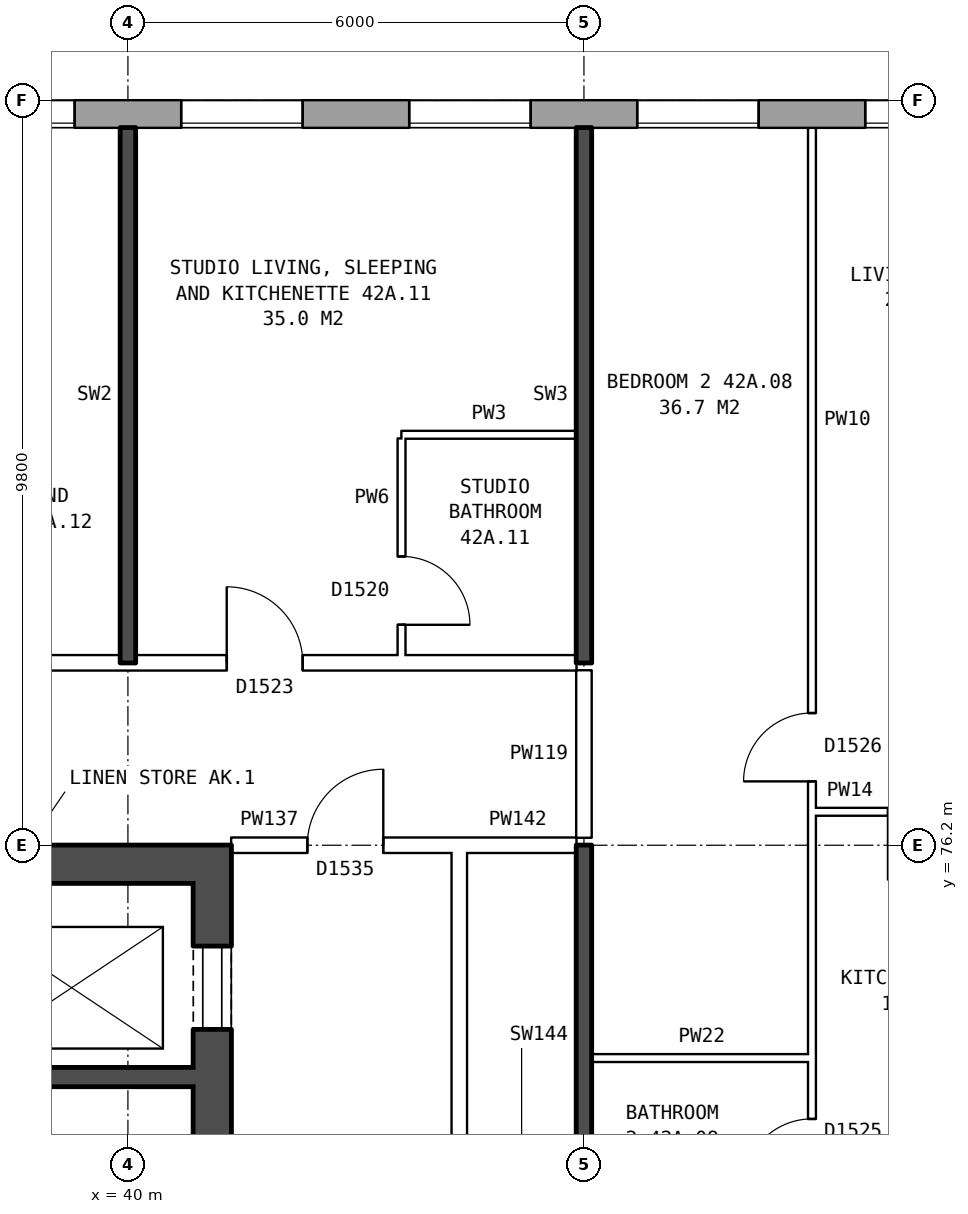
"""IFC4 building model, lengths in metres.
Left out: names, types, materials, properties, quantities, classifications, styles, units other than length and angle.
Written with IfcOpenShell. Run it as: python <this file> out.ifc"""

import sys

from ifc_helpers import new_model, si_unit, direction, frame, frame_2d, origin, place, context, subcontext, project, spatial, rectangle, extrude, element, fill, save


model = new_model("IFC4")
c1 = context("Model", 3, precision=1e-05, world=origin(), true_north=direction((0.0, 1.0)))
c2 = subcontext(c1, "Body", "Model", "MODEL_VIEW")
j1 = project(units=[si_unit("LENGTHUNIT", "METRE"), si_unit("PLANEANGLEUNIT", "RADIAN")], contexts=[c1])
p1 = place(None, origin())
s1 = spatial("IfcSite", under=j1, at=p1, CompositionType="ELEMENT")
p2 = place(p1, origin())
s2 = spatial("IfcBuilding", under=s1, at=p2, CompositionType="ELEMENT")
p3 = place(p2, frame((0.0, 0.0, 151.6)))
s3 = spatial("IfcBuildingStorey", under=s2, at=p3, CompositionType="ELEMENT", Elevation=151.6)
p4 = place(p3, frame((72.925, 85.82, 0.0), z_axis=(0.0, 0.0, 1.0), x_axis=(-1.0, 0.0, 0.0)))
e1 = element("IfcWall", 1, at=p4, inside=s3, PredefinedType="STANDARD", context=c2, shape_type="SweptSolid", body=[
    extrude(rectangle(XDim=41.351, YDim=0.36, at=frame_2d((20.675, 0.0))), origin(), (0.0, 0.0, 1.0), 2.85),
])
p5 = place(p4, frame((0.3, 0.0, 0.8)))
e2 = element("IfcOpeningElement", 2, at=p5, cuts=e1, PredefinedType="OPENING", context=c2, shape_type="SweptSolid", body=[
    extrude(rectangle(XDim=1.4, YDim=1.8, at=frame_2d((0.7, 0.9))), frame((0.0, 0.19, 0.0), z_axis=(0.0, -1.0, 0.0), x_axis=(1.0, 0.0, 0.0)), (0.0, 0.0, 1.0), 0.38),
])
p6 = place(p4, frame((4.225, 0.0, 0.8)))
e3 = element("IfcOpeningElement", 3, at=p6, cuts=e1, PredefinedType="OPENING", context=c2, shape_type="SweptSolid", body=[
    extrude(rectangle(XDim=1.0, YDim=0.9, at=frame_2d((0.5, 0.45))), frame((0.0, 0.19, 0.0), z_axis=(0.0, -1.0, 0.0), x_axis=(1.0, 0.0, 0.0)), (0.0, 0.0, 1.0), 0.38),
])
p7 = place(p4, frame((6.625, 0.0, 0.8)))
e4 = element("IfcOpeningElement", 4, at=p7, cuts=e1, PredefinedType="OPENING", context=c2, shape_type="SweptSolid", body=[
    extrude(rectangle(XDim=1.6, YDim=1.8, at=frame_2d((0.8, 0.9))), frame((0.0, 0.19, 0.0), z_axis=(0.0, -1.0, 0.0), x_axis=(1.0, 0.0, 0.0)), (0.0, 0.0, 1.0), 0.38),
])
p8 = place(p4, frame((9.625, 0.0, 0.8)))
e5 = element("IfcOpeningElement", 5, at=p8, cuts=e1, PredefinedType="OPENING", context=c2, shape_type="SweptSolid", body=[
    extrude(rectangle(XDim=1.6, YDim=1.8, at=frame_2d((0.8, 0.9))), frame((0.0, 0.19, 0.0), z_axis=(0.0, -1.0, 0.0), x_axis=(1.0, 0.0, 0.0)), (0.0, 0.0, 1.0), 0.38),
])
p9 = place(p4, frame((12.625, 0.0, 0.8)))
e6 = element("IfcOpeningElement", 6, at=p9, cuts=e1, PredefinedType="OPENING", context=c2, shape_type="SweptSolid", body=[
    extrude(rectangle(XDim=1.6, YDim=1.8, at=frame_2d((0.8, 0.9))), frame((0.0, 0.19, 0.0), z_axis=(0.0, -1.0, 0.0), x_axis=(1.0, 0.0, 0.0)), (0.0, 0.0, 1.0), 0.38),
])
p10 = place(p4, frame((15.625, 0.0, 0.8)))
e7 = element("IfcOpeningElement", 7, at=p10, cuts=e1, PredefinedType="OPENING", context=c2, shape_type="SweptSolid", body=[
    extrude(rectangle(XDim=1.6, YDim=1.8, at=frame_2d((0.8, 0.9))), frame((0.0, 0.19, 0.0), z_axis=(0.0, -1.0, 0.0), x_axis=(1.0, 0.0, 0.0)), (0.0, 0.0, 1.0), 0.38),
])
p11 = place(p4, frame((18.625, 0.0, 0.8)))
e8 = element("IfcOpeningElement", 8, at=p11, cuts=e1, PredefinedType="OPENING", context=c2, shape_type="SweptSolid", body=[
    extrude(rectangle(XDim=1.6, YDim=1.8, at=frame_2d((0.8, 0.9))), frame((0.0, 0.19, 0.0), z_axis=(0.0, -1.0, 0.0), x_axis=(1.0, 0.0, 0.0)), (0.0, 0.0, 1.0), 0.38),
])
p12 = place(p4, frame((21.625, 0.0, 0.8)))
e9 = element("IfcOpeningElement", 9, at=p12, cuts=e1, PredefinedType="OPENING", context=c2, shape_type="SweptSolid", body=[
    extrude(rectangle(XDim=1.6, YDim=1.8, at=frame_2d((0.8, 0.9))), frame((0.0, 0.19, 0.0), z_axis=(0.0, -1.0, 0.0), x_axis=(1.0, 0.0, 0.0)), (0.0, 0.0, 1.0), 0.38),
])
p13 = place(p4, frame((24.625, 0.0, 0.8)))
e10 = element("IfcOpeningElement", 10, at=p13, cuts=e1, PredefinedType="OPENING", context=c2, shape_type="SweptSolid", body=[
    extrude(rectangle(XDim=1.6, YDim=1.8, at=frame_2d((0.8, 0.9))), frame((0.0, 0.19, 0.0), z_axis=(0.0, -1.0, 0.0), x_axis=(1.0, 0.0, 0.0)), (0.0, 0.0, 1.0), 0.38),
])
p14 = place(p4, frame((27.625, 0.0, 0.8)))
e11 = element("IfcOpeningElement", 11, at=p14, cuts=e1, PredefinedType="OPENING", context=c2, shape_type="SweptSolid", body=[
    extrude(rectangle(XDim=1.6, YDim=1.8, at=frame_2d((0.8, 0.9))), frame((0.0, 0.19, 0.0), z_axis=(0.0, -1.0, 0.0), x_axis=(1.0, 0.0, 0.0)), (0.0, 0.0, 1.0), 0.38),
])
p15 = place(p4, frame((30.625, 0.0, 0.8)))
e12 = element("IfcOpeningElement", 12, at=p15, cuts=e1, PredefinedType="OPENING", context=c2, shape_type="SweptSolid", body=[
    extrude(rectangle(XDim=1.6, YDim=1.8, at=frame_2d((0.8, 0.9))), frame((0.0, 0.19, 0.0), z_axis=(0.0, -1.0, 0.0), x_axis=(1.0, 0.0, 0.0)), (0.0, 0.0, 1.0), 0.38),
])
p16 = place(p4, frame((33.625, 0.0, 0.8)))
e13 = element("IfcOpeningElement", 13, at=p16, cuts=e1, PredefinedType="OPENING", context=c2, shape_type="SweptSolid", body=[
    extrude(rectangle(XDim=1.6, YDim=1.8, at=frame_2d((0.8, 0.9))), frame((0.0, 0.19, 0.0), z_axis=(0.0, -1.0, 0.0), x_axis=(1.0, 0.0, 0.0)), (0.0, 0.0, 1.0), 0.38),
])
p17 = place(p4, frame((35.525, 0.0, 0.8)))
e14 = element("IfcOpeningElement", 14, at=p17, cuts=e1, PredefinedType="OPENING", context=c2, shape_type="SweptSolid", body=[
    extrude(rectangle(XDim=1.2, YDim=1.2, at=frame_2d((0.6, 0.6))), frame((0.0, 0.19, 0.0), z_axis=(0.0, -1.0, 0.0), x_axis=(1.0, 0.0, 0.0)), (0.0, 0.0, 1.0), 0.38),
])
p18 = place(p4, frame((2.0, 0.0, 1.4)))
e15 = element("IfcOpeningElement", 15, at=p18, cuts=e1, PredefinedType="OPENING", context=c2, shape_type="SweptSolid", body=[
    extrude(rectangle(XDim=0.6, YDim=1.2, at=frame_2d((0.3, 0.6))), frame((0.0, 0.19, 0.0), z_axis=(0.0, -1.0, 0.0), x_axis=(1.0, 0.0, 0.0)), (0.0, 0.0, 1.0), 0.38),
])
p19 = place(p4, frame((5.525, 0.0, 0.8)))
e16 = element("IfcOpeningElement", 16, at=p19, cuts=e1, PredefinedType="OPENING", context=c2, shape_type="SweptSolid", body=[
    extrude(rectangle(XDim=0.8, YDim=1.8, at=frame_2d((0.4, 0.9))), frame((0.0, 0.19, 0.0), z_axis=(0.0, -1.0, 0.0), x_axis=(1.0, 0.0, 0.0)), (0.0, 0.0, 1.0), 0.38),
])
p20 = place(p3, frame((41.11, 76.2, 0.0), z_axis=(0.0, 0.0, 1.0), x_axis=(0.0, -1.0, 0.0)))
e17 = element("IfcWall", 17, at=p20, inside=s3, PredefinedType="SHEAR", context=c2, shape_type="SweptSolid", body=[
    extrude(rectangle(XDim=12.4, YDim=0.5, at=frame_2d((6.2, 0.0))), origin(), (0.0, 0.0, 1.0), 2.85),
])
p21 = place(p20, frame((1.325, 0.0, 0.0)))
e18 = element("IfcOpeningElement", 18, at=p21, cuts=e17, PredefinedType="OPENING", context=c2, shape_type="SweptSolid", body=[
    extrude(rectangle(XDim=1.1, YDim=2.1, at=frame_2d((0.55, 1.05))), frame((0.0, 0.26, 0.0), z_axis=(0.0, -1.0, 0.0), x_axis=(1.0, 0.0, 0.0)), (0.0, 0.0, 1.0), 0.52),
])
p22 = place(p20, frame((4.225, 0.0, 0.0)))
e19 = element("IfcOpeningElement", 19, at=p22, cuts=e17, PredefinedType="OPENING", context=c2, shape_type="SweptSolid", body=[
    extrude(rectangle(XDim=0.85, YDim=2.1, at=frame_2d((0.425, 1.05))), frame((0.0, 0.26, 0.0), z_axis=(0.0, -1.0, 0.0), x_axis=(1.0, 0.0, 0.0)), (0.0, 0.0, 1.0), 0.52),
])
p23 = place(p20, frame((7.475, 0.0, 0.0)))
e20 = element("IfcOpeningElement", 20, at=p23, cuts=e17, PredefinedType="OPENING", context=c2, shape_type="SweptSolid", body=[
    extrude(rectangle(XDim=0.85, YDim=2.1, at=frame_2d((0.425, 1.05))), frame((0.0, 0.26, 0.0), z_axis=(0.0, -1.0, 0.0), x_axis=(1.0, 0.0, 0.0)), (0.0, 0.0, 1.0), 0.52),
])
p24 = place(p20, frame((9.9, 0.0, 0.0)))
e21 = element("IfcOpeningElement", 21, at=p24, cuts=e17, PredefinedType="OPENING", context=c2, shape_type="SweptSolid", body=[
    extrude(rectangle(XDim=1.1, YDim=2.1, at=frame_2d((0.55, 1.05))), frame((0.0, 0.26, 0.0), z_axis=(0.0, -1.0, 0.0), x_axis=(1.0, 0.0, 0.0)), (0.0, 0.0, 1.0), 0.52),
])
p25 = place(p3, frame((40.86, 75.95, 0.0), z_axis=(0.0, 0.0, 1.0), x_axis=(-1.0, 0.0, 0.0)))
e22 = element("IfcWall", 22, at=p25, inside=s3, PredefinedType="SHEAR", context=c2, shape_type="SweptSolid", body=[
    extrude(rectangle(XDim=8.0, YDim=0.5, at=frame_2d((4.0, 0.0))), origin(), (0.0, 0.0, 1.0), 2.85),
])
p26 = place(p3, frame((40.86, 73.15, 0.0), z_axis=(0.0, 0.0, 1.0), x_axis=(-1.0, 0.0, 0.0)))
e23 = element("IfcWall", 23, at=p26, inside=s3, PredefinedType="SHEAR", context=c2, shape_type="SweptSolid", body=[
    extrude(rectangle(XDim=3.495, YDim=0.25, at=frame_2d((1.748, 0.0))), origin(), (0.0, 0.0, 1.0), 2.85),
])
p27 = place(p3, frame((44.36, 63.9, 0.0), z_axis=(0.0, 0.0, 1.0), x_axis=(0.0, 1.0, 0.0)))
e24 = element("IfcWall", 24, at=p27, inside=s3, PredefinedType="PARTITIONING", context=c2, shape_type="SweptSolid", body=[
    extrude(rectangle(XDim=12.2, YDim=0.2, at=frame_2d((6.1, 0.0))), origin(), (0.0, 0.0, 1.0), 2.85),
])
p28 = place(p27, frame((5.1, 0.0, 0.0)))
e25 = element("IfcOpeningElement", 25, at=p28, cuts=e24, PredefinedType="OPENING", context=c2, shape_type="SweptSolid", body=[
    extrude(rectangle(XDim=2.0, YDim=2.1, at=frame_2d((1.0, 1.05))), frame((0.0, 0.11, 0.0), z_axis=(0.0, -1.0, 0.0), x_axis=(1.0, 0.0, 0.0)), (0.0, 0.0, 1.0), 0.22),
])
p29 = place(p3, frame((46.1, 73.4, 0.0), z_axis=(0.0, 0.0, 1.0), x_axis=(1.0, 0.0, 0.0)))
e26 = element("IfcWall", 26, at=p29, inside=s3, PredefinedType="PARTITIONING", context=c2, shape_type="SweptSolid", body=[
    extrude(rectangle(XDim=2.9, YDim=0.1, at=frame_2d((1.45, 0.0))), origin(), (0.0, 0.0, 1.0), 2.85),
])
p30 = place(p3, frame((41.36, 76.2, 0.0), z_axis=(0.0, 0.0, 1.0), x_axis=(1.0, 0.0, 0.0)))
e27 = element("IfcWall", 27, at=p30, inside=s3, PredefinedType="PARTITIONING", context=c2, shape_type="SweptSolid", body=[
    extrude(rectangle(XDim=3.0, YDim=0.2, at=frame_2d((1.5, 0.0))), origin(), (0.0, 0.0, 1.0), 2.85),
])
p31 = place(p30, frame((1.0, 0.0, 0.0)))
e28 = element("IfcOpeningElement", 28, at=p31, cuts=e27, PredefinedType="OPENING", context=c2, shape_type="SweptSolid", body=[
    extrude(rectangle(XDim=1.0, YDim=2.1, at=frame_2d((0.5, 1.05))), frame((0.0, 0.11, 0.0), z_axis=(0.0, -1.0, 0.0), x_axis=(1.0, 0.0, 0.0)), (0.0, 0.0, 1.0), 0.22),
])
p32 = place(p3, frame((44.36, 76.2, 0.0), z_axis=(0.0, 0.0, 1.0), x_axis=(1.0, 0.0, 0.0)))
e29 = element("IfcWall", 29, at=p32, inside=s3, PredefinedType="PARTITIONING", context=c2, shape_type="SweptSolid", body=[
    extrude(rectangle(XDim=1.54, YDim=0.2, at=frame_2d((0.77, 0.0))), origin(), (0.0, 0.0, 1.0), 2.85),
])
p33 = place(p3, frame((49.0, 76.64, 0.0), z_axis=(0.0, 0.0, 1.0), x_axis=(1.0, 0.0, 0.0)))
e30 = element("IfcWall", 30, at=p33, inside=s3, PredefinedType="PARTITIONING", context=c2, shape_type="SweptSolid", body=[
    extrude(rectangle(XDim=2.9, YDim=0.1, at=frame_2d((1.45, 0.0))), origin(), (0.0, 0.0, 1.0), 2.85),
])
p34 = place(p33, frame((1.0, 0.0, 0.0)))
e31 = element("IfcOpeningElement", 31, at=p34, cuts=e30, PredefinedType="OPENING", context=c2, shape_type="SweptSolid", body=[
    extrude(rectangle(XDim=0.9, YDim=2.1, at=frame_2d((0.45, 1.05))), frame((0.0, 0.06, 0.0), z_axis=(0.0, -1.0, 0.0), x_axis=(1.0, 0.0, 0.0)), (0.0, 0.0, 1.0), 0.12),
])
p35 = place(p3, frame((28.86, 78.6, 0.0), z_axis=(0.0, 0.0, 1.0), x_axis=(1.0, 0.0, 0.0)))
e32 = element("IfcWall", 32, at=p35, inside=s3, PredefinedType="PARTITIONING", context=c2, shape_type="SweptSolid", body=[
    extrude(rectangle(XDim=17.04, YDim=0.2, at=frame_2d((8.52, 0.0))), origin(), (0.0, 0.0, 1.0), 2.85),
])
p36 = place(p35, frame((12.44, 0.0, 0.0)))
e33 = element("IfcOpeningElement", 33, at=p36, cuts=e32, PredefinedType="OPENING", context=c2, shape_type="SweptSolid", body=[
    extrude(rectangle(XDim=1.0, YDim=2.1, at=frame_2d((0.5, 1.05))), frame((0.0, 0.11, 0.0), z_axis=(0.0, -1.0, 0.0), x_axis=(1.0, 0.0, 0.0)), (0.0, 0.0, 1.0), 0.22),
])
p37 = place(p35, frame((7.64, 0.0, 0.0)))
e34 = element("IfcOpeningElement", 34, at=p37, cuts=e32, PredefinedType="OPENING", context=c2, shape_type="SweptSolid", body=[
    extrude(rectangle(XDim=1.0, YDim=2.1, at=frame_2d((0.5, 1.05))), frame((0.0, 0.11, 0.0), z_axis=(0.0, -1.0, 0.0), x_axis=(1.0, 0.0, 0.0)), (0.0, 0.0, 1.0), 0.22),
])
p38 = place(p3, frame((43.6, 81.6, 0.0), z_axis=(0.0, 0.0, 1.0), x_axis=(1.0, 0.0, 0.0)))
e35 = element("IfcWall", 35, at=p38, inside=s3, PredefinedType="PARTITIONING", context=c2, shape_type="SweptSolid", body=[
    extrude(rectangle(XDim=2.3, YDim=0.1, at=frame_2d((1.15, 0.0))), origin(), (0.0, 0.0, 1.0), 2.85),
])
p39 = place(p3, frame((40.0, 78.6, 0.0), z_axis=(0.0, 0.0, 1.0), x_axis=(0.0, 1.0, 0.0)))
e36 = element("IfcWall", 36, at=p39, inside=s3, PredefinedType="SOLIDWALL", context=c2, shape_type="SweptSolid", body=[
    extrude(rectangle(XDim=7.04, YDim=0.2, at=frame_2d((3.52, 0.0))), origin(), (0.0, 0.0, 1.0), 2.85),
])
p40 = place(p3, frame((43.6, 78.7, 0.0), z_axis=(0.0, 0.0, 1.0), x_axis=(0.0, 1.0, 0.0)))
e37 = element("IfcWall", 37, at=p40, inside=s3, PredefinedType="PARTITIONING", context=c2, shape_type="SweptSolid", body=[
    extrude(rectangle(XDim=2.85, YDim=0.1, at=frame_2d((1.425, 0.0))), origin(), (0.0, 0.0, 1.0), 2.85),
])
p41 = place(p40, frame((0.4, 0.0, 0.0)))
e38 = element("IfcOpeningElement", 38, at=p41, cuts=e37, PredefinedType="OPENING", context=c2, shape_type="SweptSolid", body=[
    extrude(rectangle(XDim=0.9, YDim=2.1, at=frame_2d((0.45, 1.05))), frame((0.0, 0.06, 0.0), z_axis=(0.0, -1.0, 0.0), x_axis=(1.0, 0.0, 0.0)), (0.0, 0.0, 1.0), 0.12),
])
p42 = place(p3, frame((46.0, 71.2, 0.0), z_axis=(0.0, 0.0, 1.0), x_axis=(0.0, 1.0, 0.0)))
e39 = element("IfcWall", 39, at=p42, inside=s3, PredefinedType="SOLIDWALL", context=c2, shape_type="SweptSolid", body=[
    extrude(rectangle(XDim=5.0, YDim=0.2, at=frame_2d((2.5, 0.0))), origin(), (0.0, 0.0, 1.0), 2.85),
])
p43 = place(p3, frame((46.0, 76.3, 0.0), z_axis=(0.0, 0.0, 1.0), x_axis=(0.0, 1.0, 0.0)))
e40 = element("IfcWall", 40, at=p43, inside=s3, PredefinedType="PARTITIONING", context=c2, shape_type="SweptSolid", body=[
    extrude(rectangle(XDim=2.2, YDim=0.2, at=frame_2d((1.1, 0.0))), origin(), (0.0, 0.0, 1.0), 2.85),
])
p44 = place(p3, frame((46.0, 78.6, 0.0), z_axis=(0.0, 0.0, 1.0), x_axis=(0.0, 1.0, 0.0)))
e41 = element("IfcWall", 41, at=p44, inside=s3, PredefinedType="SOLIDWALL", context=c2, shape_type="SweptSolid", body=[
    extrude(rectangle(XDim=7.04, YDim=0.2, at=frame_2d((3.52, 0.0))), origin(), (0.0, 0.0, 1.0), 2.85),
])
p45 = place(p3, frame((49.0, 71.3, 0.0), z_axis=(0.0, 0.0, 1.0), x_axis=(0.0, 1.0, 0.0)))
e42 = element("IfcWall", 42, at=p45, inside=s3, PredefinedType="PARTITIONING", context=c2, shape_type="SweptSolid", body=[
    extrude(rectangle(XDim=14.34, YDim=0.1, at=frame_2d((7.17, 0.0))), origin(), (0.0, 0.0, 1.0), 2.85),
])
p46 = place(p45, frame((5.74, 0.0, 0.0)))
e43 = element("IfcOpeningElement", 43, at=p46, cuts=e42, PredefinedType="OPENING", context=c2, shape_type="SweptSolid", body=[
    extrude(rectangle(XDim=0.9, YDim=2.1, at=frame_2d((0.45, 1.05))), frame((0.0, 0.06, 0.0), z_axis=(0.0, -1.0, 0.0), x_axis=(1.0, 0.0, 0.0)), (0.0, 0.0, 1.0), 0.12),
])
p47 = place(p45, frame((0.4, 0.0, 0.0)))
e44 = element("IfcOpeningElement", 44, at=p47, cuts=e42, PredefinedType="OPENING", context=c2, shape_type="SweptSolid", body=[
    extrude(rectangle(XDim=0.9, YDim=2.1, at=frame_2d((0.45, 1.05))), frame((0.0, 0.06, 0.0), z_axis=(0.0, -1.0, 0.0), x_axis=(1.0, 0.0, 0.0)), (0.0, 0.0, 1.0), 0.12),
])
p48 = place(p12, origin())
e45 = element("IfcWindow", 45, at=p48, inside=s3, PartitioningType="SINGLE_PANEL", PredefinedType="WINDOW", context=c2, shape_type="SweptSolid", body=[
    extrude(rectangle(XDim=1.6, YDim=1.8, at=frame_2d((0.8, 0.9))), frame((0.0, 0.15, 0.0), z_axis=(0.0, -1.0, 0.0), x_axis=(1.0, 0.0, 0.0)), (0.0, 0.0, 1.0), 0.06),
])
fill(e9, e45)
p49 = place(p13, origin())
e46 = element("IfcWindow", 46, at=p49, inside=s3, PartitioningType="SINGLE_PANEL", PredefinedType="WINDOW", context=c2, shape_type="SweptSolid", body=[
    extrude(rectangle(XDim=1.6, YDim=1.8, at=frame_2d((0.8, 0.9))), frame((0.0, 0.15, 0.0), z_axis=(0.0, -1.0, 0.0), x_axis=(1.0, 0.0, 0.0)), (0.0, 0.0, 1.0), 0.06),
])
fill(e10, e46)
p50 = place(p14, origin())
e47 = element("IfcWindow", 47, at=p50, inside=s3, PartitioningType="SINGLE_PANEL", PredefinedType="WINDOW", context=c2, shape_type="SweptSolid", body=[
    extrude(rectangle(XDim=1.6, YDim=1.8, at=frame_2d((0.8, 0.9))), frame((0.0, 0.15, 0.0), z_axis=(0.0, -1.0, 0.0), x_axis=(1.0, 0.0, 0.0)), (0.0, 0.0, 1.0), 0.06),
])
fill(e11, e47)
p51 = place(p15, origin())
e48 = element("IfcWindow", 48, at=p51, inside=s3, PartitioningType="SINGLE_PANEL", PredefinedType="WINDOW", context=c2, shape_type="SweptSolid", body=[
    extrude(rectangle(XDim=1.6, YDim=1.8, at=frame_2d((0.8, 0.9))), frame((0.0, 0.15, 0.0), z_axis=(0.0, -1.0, 0.0), x_axis=(1.0, 0.0, 0.0)), (0.0, 0.0, 1.0), 0.06),
])
fill(e12, e48)
p52 = place(p16, origin())
e49 = element("IfcWindow", 49, at=p52, inside=s3, PartitioningType="SINGLE_PANEL", PredefinedType="WINDOW", context=c2, shape_type="SweptSolid", body=[
    extrude(rectangle(XDim=1.6, YDim=1.8, at=frame_2d((0.8, 0.9))), frame((0.0, 0.15, 0.0), z_axis=(0.0, -1.0, 0.0), x_axis=(1.0, 0.0, 0.0)), (0.0, 0.0, 1.0), 0.06),
])
fill(e13, e49)
p53 = place(p21, origin())
e50 = element("IfcDoor", 50, at=p53, inside=s3, OperationType="DOUBLE_DOOR_SLIDING", PredefinedType="DOOR", context=c2, shape_type="SweptSolid", body=[
    extrude(rectangle(XDim=1.1, YDim=2.1, at=frame_2d((0.55, 1.05))), frame((0.0, -0.185, 0.0), z_axis=(0.0, -1.0, 0.0), x_axis=(1.0, 0.0, 0.0)), (0.0, 0.0, 1.0), 0.05),
])
fill(e18, e50)
p54 = place(p31, origin())
e51 = element("IfcDoor", 51, at=p54, inside=s3, OperationType="SINGLE_SWING_RIGHT", PredefinedType="DOOR", context=c2, shape_type="SweptSolid", body=[
    extrude(rectangle(XDim=1.0, YDim=2.1, at=frame_2d((0.5, 1.05))), frame((0.0, 0.025, 0.0), z_axis=(0.0, -1.0, 0.0), x_axis=(1.0, 0.0, 0.0)), (0.0, 0.0, 1.0), 0.05),
])
fill(e28, e51)
p55 = place(p46, origin())
e52 = element("IfcDoor", 52, at=p55, inside=s3, OperationType="SINGLE_SWING_LEFT", PredefinedType="DOOR", context=c2, shape_type="SweptSolid", body=[
    extrude(rectangle(XDim=0.9, YDim=2.1, at=frame_2d((0.45, 1.05))), frame((0.0, 0.025, 0.0), z_axis=(0.0, -1.0, 0.0), x_axis=(1.0, 0.0, 0.0)), (0.0, 0.0, 1.0), 0.05),
])
fill(e43, e52)
p56 = place(p47, origin())
e53 = element("IfcDoor", 53, at=p56, inside=s3, OperationType="SINGLE_SWING_LEFT", PredefinedType="DOOR", context=c2, shape_type="SweptSolid", body=[
    extrude(rectangle(XDim=0.9, YDim=2.1, at=frame_2d((0.45, 1.05))), frame((0.0, 0.025, 0.0), z_axis=(0.0, -1.0, 0.0), x_axis=(1.0, 0.0, 0.0)), (0.0, 0.0, 1.0), 0.05),
])
fill(e44, e53)
p57 = place(p36, origin())
e54 = element("IfcDoor", 54, at=p57, inside=s3, OperationType="SINGLE_SWING_LEFT", PredefinedType="DOOR", context=c2, shape_type="SweptSolid", body=[
    extrude(rectangle(XDim=1.0, YDim=2.1, at=frame_2d((0.5, 1.05))), frame((0.0, 0.025, 0.0), z_axis=(0.0, -1.0, 0.0), x_axis=(1.0, 0.0, 0.0)), (0.0, 0.0, 1.0), 0.05),
])
fill(e33, e54)
p58 = place(p41, frame((0.9, 0.0, 0.0), z_axis=(0.0, 0.0, 1.0), x_axis=(-1.0, 0.0, 0.0)))
e55 = element("IfcDoor", 55, at=p58, inside=s3, OperationType="SINGLE_SWING_RIGHT", PredefinedType="DOOR", context=c2, shape_type="SweptSolid", body=[
    extrude(rectangle(XDim=0.9, YDim=2.1, at=frame_2d((0.45, 1.05))), frame((0.0, 0.025, 0.0), z_axis=(0.0, -1.0, 0.0), x_axis=(1.0, 0.0, 0.0)), (0.0, 0.0, 1.0), 0.05),
])
fill(e38, e55)
save(model, sys.argv[1])
